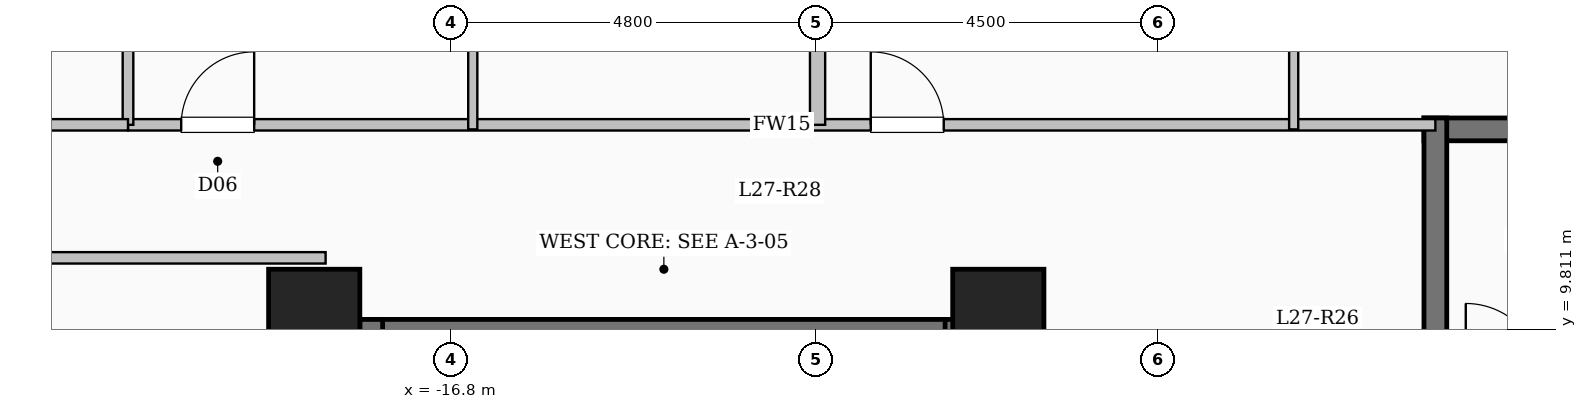
"""IFC4 building model, lengths in metres.
Left out: names, types, materials, properties, quantities, classifications, styles, units other than length and angle.
Written with IfcOpenShell. Run it as: python <this file> out.ifc"""

import sys

from ifc_helpers import new_model, si_unit, direction, frame, frame_2d, origin, origin_2d, place, context, subcontext, project, spatial, rectangle, extrude, element, fill, save


model = new_model("IFC4")
c1 = context("Model", 3, precision=1e-05, world=origin(), true_north=direction((0.0, 1.0)))
c2 = subcontext(c1, "Body", "Model", "MODEL_VIEW")
j1 = project(units=[si_unit("LENGTHUNIT", "METRE"), si_unit("PLANEANGLEUNIT", "RADIAN")], contexts=[c1])
p1 = place(None, origin())
s1 = spatial("IfcSite", under=j1, at=p1, CompositionType="ELEMENT")
p2 = place(p1, origin())
s2 = spatial("IfcBuilding", under=s1, at=p2, CompositionType="ELEMENT")
p3 = place(p2, frame((0.0, 0.0, 101.75)))
s3 = spatial("IfcBuildingStorey", under=s2, at=p3, CompositionType="ELEMENT", Elevation=101.75)
for number, where, z_axis, x_axis in (
    (1, (-9.6, 10.0, 0.0), (0.0, 0.0, 1.0), (1.0, 0.0, 0.0)),
    (2, (-18.6, 10.0, 0.0), (0.0, 0.0, 1.0), (1.0, 0.0, 0.0)),
):
    element("IfcColumn", number, at=place(p3, frame(where, z_axis=z_axis, x_axis=x_axis)), inside=s3, PredefinedType="COLUMN", context=c2, shape_type="SweptSolid", body=[
        extrude(rectangle(XDim=1.2, YDim=1.2, at=origin_2d()), origin(), (0.0, 0.0, 1.0), 3.35),
    ])
p4 = place(p3, frame((-18.0, 9.79, 0.0), z_axis=(0.0, 0.0, 1.0), x_axis=(1.0, 0.0, 0.0)))
e3 = element("IfcWall", 3, at=p4, inside=s3, PredefinedType="SHEAR", context=c2, shape_type="SweptSolid", body=[
    extrude(rectangle(XDim=8.0, YDim=0.3, at=frame_2d((4.0, 0.0))), origin(), (0.0, 0.0, 1.0), 3.35),
])
for number, where, z_axis, x_axis in (
    (4, (-17.85, 6.35, 0.0), (0.0, 0.0, 1.0), (0.0, 1.0, 0.0)),
    (5, (-10.15, 6.35, 0.0), (0.0, 0.0, 1.0), (0.0, 1.0, 0.0)),
):
    element("IfcWall", number, at=place(p3, frame(where, z_axis=z_axis, x_axis=x_axis)), inside=s3, PredefinedType="SHEAR", context=c2, shape_type="SweptSolid", body=[
        extrude(rectangle(XDim=3.59, YDim=0.3, at=frame_2d((1.795, 0.0))), origin(), (0.0, 0.0, 1.0), 3.35),
    ])
p5 = place(p3, frame((-4.0, 12.44, 0.0), z_axis=(0.0, 0.0, 1.0), x_axis=(1.0, 0.0, 0.0)))
e6 = element("IfcWall", 6, at=p5, inside=s3, PredefinedType="SHEAR", context=c2, shape_type="SweptSolid", body=[
    extrude(rectangle(XDim=8.0, YDim=0.3, at=frame_2d((4.0, 0.0))), origin(), (0.0, 0.0, 1.0), 3.35),
])
p6 = place(p3, frame((-3.85, 9.0, 0.0), z_axis=(0.0, 0.0, 1.0), x_axis=(0.0, 1.0, 0.0)))
e7 = element("IfcWall", 7, at=p6, inside=s3, PredefinedType="SHEAR", context=c2, shape_type="SweptSolid", body=[
    extrude(rectangle(XDim=3.59, YDim=0.3, at=frame_2d((1.795, 0.0))), origin(), (0.0, 0.0, 1.0), 3.35),
])
p7 = place(p3, frame((-21.05, 12.5, 0.0), z_axis=(0.0, 0.0, 1.0), x_axis=(1.0, 0.0, 0.0)))
e8 = element("IfcWall", 8, at=p7, inside=s3, PredefinedType="PARTITIONING", context=c2, shape_type="SweptSolid", body=[
    extrude(rectangle(XDim=17.2, YDim=0.15, at=frame_2d((8.6, 0.0))), origin(), (0.0, 0.0, 1.0), 3.1),
])
p8 = place(p7, frame((0.7, 0.0, 0.0)))
e9 = element("IfcOpeningElement", 9, at=p8, cuts=e8, PredefinedType="OPENING", context=c2, shape_type="SweptSolid", body=[
    extrude(rectangle(XDim=0.96, YDim=2.15, at=frame_2d((0.48, 1.075))), frame((0.0, 0.085, 0.0), z_axis=(0.0, -1.0, 0.0), x_axis=(1.0, 0.0, 0.0)), (0.0, 0.0, 1.0), 0.17),
])
p9 = place(p7, frame((9.772, 0.0, 0.0)))
e10 = element("IfcOpeningElement", 10, at=p9, cuts=e8, PredefinedType="OPENING", context=c2, shape_type="SweptSolid", body=[
    extrude(rectangle(XDim=0.96, YDim=2.15, at=frame_2d((0.48, 1.075))), frame((0.0, 0.085, 0.0), z_axis=(0.0, -1.0, 0.0), x_axis=(1.0, 0.0, 0.0)), (0.0, 0.0, 1.0), 0.17),
])
p10 = place(p3, frame((-11.978, 12.5, 0.0), z_axis=(0.0, 0.0, 1.0), x_axis=(0.0, 1.0, 0.0)))
e11 = element("IfcWall", 11, at=p10, inside=s3, PredefinedType="SOLIDWALL", context=c2, shape_type="SweptSolid", body=[
    extrude(rectangle(XDim=9.6, YDim=0.2, at=frame_2d((4.8, 0.0))), origin(), (0.0, 0.0, 1.0), 3.1),
])
p11 = place(p3, frame((-16.514, 12.44, 0.0), z_axis=(0.0, 0.0, 1.0), x_axis=(0.0, 1.0, 0.0)))
e12 = element("IfcWall", 12, at=p11, inside=s3, PredefinedType="PARTITIONING", context=c2, shape_type="SweptSolid", body=[
    extrude(rectangle(XDim=3.21, YDim=0.12, at=frame_2d((1.605, 0.0))), origin(), (0.0, 0.0, 1.0), 3.1),
])
p12 = place(p11, frame((1.195, 0.0, 0.0)))
e13 = element("IfcOpeningElement", 13, at=p12, cuts=e12, PredefinedType="OPENING", context=c2, shape_type="SweptSolid", body=[
    extrude(rectangle(XDim=0.88, YDim=2.1, at=frame_2d((0.44, 1.05))), frame((0.0, 0.07, 0.0), z_axis=(0.0, -1.0, 0.0), x_axis=(1.0, 0.0, 0.0)), (0.0, 0.0, 1.0), 0.14),
])
p13 = place(p3, frame((-5.714, 12.44, 0.0), z_axis=(0.0, 0.0, 1.0), x_axis=(0.0, 1.0, 0.0)))
e14 = element("IfcWall", 14, at=p13, inside=s3, PredefinedType="PARTITIONING", context=c2, shape_type="SweptSolid", body=[
    extrude(rectangle(XDim=10.964, YDim=0.12, at=frame_2d((5.482, 0.0))), origin(), (0.0, 0.0, 1.0), 3.1),
])
p14 = place(p13, frame((3.075, 0.0, 0.0)))
e15 = element("IfcOpeningElement", 15, at=p14, cuts=e14, PredefinedType="OPENING", context=c2, shape_type="SweptSolid", body=[
    extrude(rectangle(XDim=1.08, YDim=2.15, at=frame_2d((0.54, 1.075))), frame((0.0, 0.07, 0.0), z_axis=(0.0, -1.0, 0.0), x_axis=(1.0, 0.0, 0.0)), (0.0, 0.0, 1.0), 0.14),
])
p15 = place(p3, frame((-26.88, 10.75, 0.0), z_axis=(0.0, 0.0, 1.0), x_axis=(1.0, 0.0, 0.0)))
e16 = element("IfcWall", 16, at=p15, inside=s3, PredefinedType="PARTITIONING", context=c2, shape_type="SweptSolid", body=[
    extrude(rectangle(XDim=8.43, YDim=0.15, at=frame_2d((4.215, 0.0))), origin(), (0.0, 0.0, 1.0), 3.1),
])
p16 = place(p3, frame((-21.05, 12.5, 0.0), z_axis=(0.0, 0.0, 1.0), x_axis=(0.0, 1.0, 0.0)))
e17 = element("IfcWall", 17, at=p16, inside=s3, PredefinedType="PARTITIONING", context=c2, shape_type="SweptSolid", body=[
    extrude(rectangle(XDim=5.35, YDim=0.14, at=frame_2d((2.675, 0.0))), origin(), (0.0, 0.0, 1.0), 3.1),
])
p17 = place(p3, frame((-26.88, 12.5, 0.0), z_axis=(0.0, 0.0, 1.0), x_axis=(1.0, 0.0, 0.0)))
e18 = element("IfcWall", 18, at=p17, inside=s3, PredefinedType="PARTITIONING", context=c2, shape_type="SweptSolid", body=[
    extrude(rectangle(XDim=5.83, YDim=0.15, at=frame_2d((2.915, 0.0))), origin(), (0.0, 0.0, 1.0), 3.1),
])
p18 = place(p17, frame((2.44, 0.0, 0.0)))
e19 = element("IfcOpeningElement", 19, at=p18, cuts=e18, PredefinedType="OPENING", context=c2, shape_type="SweptSolid", body=[
    extrude(rectangle(XDim=0.95, YDim=2.15, at=frame_2d((0.475, 1.075))), frame((0.0, 0.085, 0.0), z_axis=(0.0, -1.0, 0.0), x_axis=(1.0, 0.0, 0.0)), (0.0, 0.0, 1.0), 0.17),
])
p19 = place(p8, origin())
e20 = element("IfcDoor", 20, at=p19, inside=s3, OperationType="SINGLE_SWING_RIGHT", PredefinedType="DOOR", context=c2, shape_type="SweptSolid", body=[
    extrude(rectangle(XDim=0.96, YDim=2.15, at=frame_2d((0.48, 1.075))), frame((0.0, 0.025, 0.0), z_axis=(0.0, -1.0, 0.0), x_axis=(1.0, 0.0, 0.0)), (0.0, 0.0, 1.0), 0.05),
])
fill(e9, e20)
p20 = place(p9, origin())
e21 = element("IfcDoor", 21, at=p20, inside=s3, OperationType="SINGLE_SWING_LEFT", PredefinedType="DOOR", context=c2, shape_type="SweptSolid", body=[
    extrude(rectangle(XDim=0.96, YDim=2.15, at=frame_2d((0.48, 1.075))), frame((0.0, 0.025, 0.0), z_axis=(0.0, -1.0, 0.0), x_axis=(1.0, 0.0, 0.0)), (0.0, 0.0, 1.0), 0.05),
])
fill(e10, e21)
save(model, sys.argv[1])
